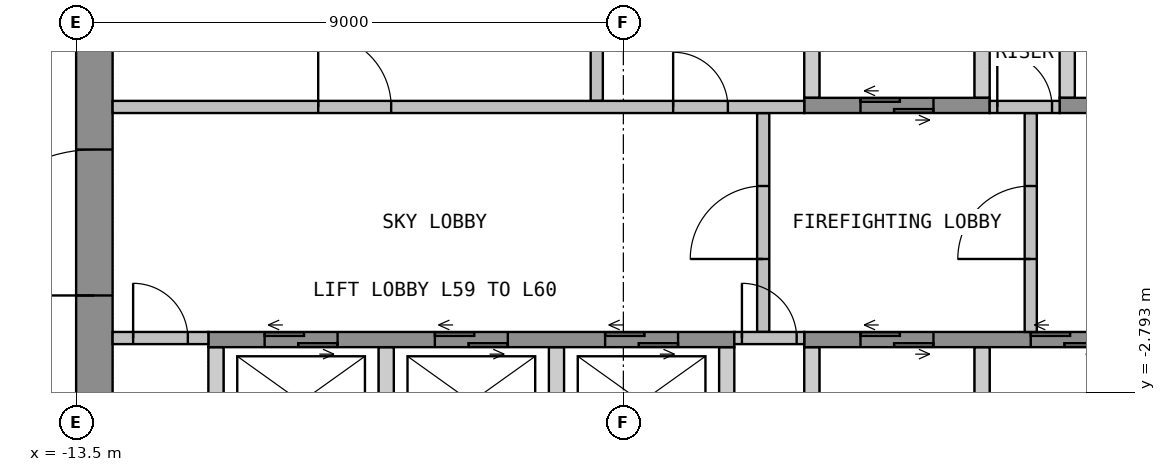
"""IFC4 building model, lengths in metres.
Left out: names, types, materials, properties, quantities, classifications, styles, units other than length and angle.
Written with IfcOpenShell. Run it as: python <this file> out.ifc"""

import sys

from ifc_helpers import new_model, si_unit, direction, frame, frame_2d, origin, place, context, subcontext, project, spatial, polyline, rectangle, outline, extrude, element, fill, save


model = new_model("IFC4")
c1 = context("Model", 3, precision=1e-05, world=origin(), true_north=direction((0.0, 1.0)))
c2 = subcontext(c1, "Body", "Model", "MODEL_VIEW")
j1 = project(units=[si_unit("LENGTHUNIT", "METRE"), si_unit("PLANEANGLEUNIT", "RADIAN")], contexts=[c1])
p1 = place(None, origin())
s1 = spatial("IfcSite", under=j1, at=p1, CompositionType="ELEMENT")
p2 = place(p1, origin())
s2 = spatial("IfcBuilding", under=s1, at=p2, CompositionType="ELEMENT")
p3 = place(p2, frame((0.0, 0.0, 235.2)))
s3 = spatial("IfcBuildingStorey", under=s2, at=p3, CompositionType="ELEMENT", Elevation=235.2)
p4 = place(p3, frame((-13.2, -10.65, 0.0), z_axis=(0.0, 0.0, 1.0), x_axis=(0.0, 1.0, 0.0)))
e1 = element("IfcWall", 1, at=p4, inside=s3, PredefinedType="SHEAR", context=c2, shape_type="SweptSolid", body=[
    extrude(rectangle(XDim=21.3, YDim=0.6, at=frame_2d((10.65, 0.0))), origin(), (0.0, 0.0, 1.0), 3.575),
])
p5 = place(p4, frame((9.45, 0.0, 0.0)))
e2 = element("IfcOpeningElement", 2, at=p5, cuts=e1, PredefinedType="OPENING", context=c2, shape_type="SweptSolid", body=[
    extrude(rectangle(XDim=2.4, YDim=2.1, at=frame_2d((1.2, 1.05))), frame((0.0, 0.31, 0.0), z_axis=(0.0, -1.0, 0.0), x_axis=(1.0, 0.0, 0.0)), (0.0, 0.0, 1.0), 0.62),
])
p6 = place(p3, origin())
e3 = element("IfcWall", 3, at=p6, inside=s3, PredefinedType="SHEAR", context=c2, shape_type="SweptSolid", body=[
    extrude(outline(polyline([(-1.525, 2.05), (-1.275, 2.05), (-1.275, 4.75), (-1.525, 4.75), (-1.525, 2.05)])), origin(), (0.0, 0.0, 1.0), 3.575),
])
p7 = place(p3, origin())
e4 = element("IfcWall", 4, at=p7, inside=s3, PredefinedType="SHEAR", context=c2, shape_type="SweptSolid", body=[
    extrude(outline(polyline([(1.275, 2.05), (1.525, 2.05), (1.525, 4.75), (1.275, 4.75), (1.275, 2.05)])), origin(), (0.0, 0.0, 1.0), 3.575),
])
p8 = place(p3, origin())
e5 = element("IfcWall", 5, at=p8, inside=s3, PredefinedType="SHEAR", context=c2, shape_type="SweptSolid", body=[
    extrude(outline(polyline([(2.675, 2.05), (2.925, 2.05), (2.925, 4.75), (2.675, 4.75), (2.675, 2.05)])), origin(), (0.0, 0.0, 1.0), 3.575),
])
p9 = place(p3, frame((-1.525, 1.925, 0.0), z_axis=(0.0, 0.0, 1.0), x_axis=(1.0, 0.0, 0.0)))
e6 = element("IfcWall", 6, at=p9, inside=s3, PredefinedType="SHEAR", context=c2, shape_type="SweptSolid", body=[
    extrude(rectangle(XDim=3.05, YDim=0.25, at=frame_2d((1.525, 0.0))), origin(), (0.0, 0.0, 1.0), 3.575),
])
p10 = place(p9, frame((0.925, 0.0, 0.0)))
e7 = element("IfcOpeningElement", 7, at=p10, cuts=e6, PredefinedType="OPENING", context=c2, shape_type="SweptSolid", body=[
    extrude(rectangle(XDim=1.2, YDim=2.1, at=frame_2d((0.6, 1.05))), frame((0.0, 0.135, 0.0), z_axis=(0.0, -1.0, 0.0), x_axis=(1.0, 0.0, 0.0)), (0.0, 0.0, 1.0), 0.27),
])
p11 = place(p3, frame((2.675, 1.925, 0.0), z_axis=(0.0, 0.0, 1.0), x_axis=(1.0, 0.0, 0.0)))
e8 = element("IfcWall", 8, at=p11, inside=s3, PredefinedType="SHEAR", context=c2, shape_type="SweptSolid", body=[
    extrude(rectangle(XDim=5.85, YDim=0.25, at=frame_2d((2.925, 0.0))), origin(), (0.0, 0.0, 1.0), 3.575),
])
p12 = place(p11, frame((0.925, 0.0, 0.0)))
e9 = element("IfcOpeningElement", 9, at=p12, cuts=e8, PredefinedType="OPENING", context=c2, shape_type="SweptSolid", body=[
    extrude(rectangle(XDim=1.2, YDim=2.1, at=frame_2d((0.6, 1.05))), frame((0.0, 0.135, 0.0), z_axis=(0.0, -1.0, 0.0), x_axis=(1.0, 0.0, 0.0)), (0.0, 0.0, 1.0), 0.27),
])
p13 = place(p11, frame((3.725, 0.0, 0.0)))
e10 = element("IfcOpeningElement", 10, at=p13, cuts=e8, PredefinedType="OPENING", context=c2, shape_type="SweptSolid", body=[
    extrude(rectangle(XDim=1.2, YDim=2.1, at=frame_2d((0.6, 1.05))), frame((0.0, 0.135, 0.0), z_axis=(0.0, -1.0, 0.0), x_axis=(1.0, 0.0, 0.0)), (0.0, 0.0, 1.0), 0.27),
])
p14 = place(p3, origin())
e11 = element("IfcWall", 11, at=p14, inside=s3, PredefinedType="SHEAR", context=c2, shape_type="SweptSolid", body=[
    extrude(outline(polyline([(-11.325, -4.75), (-11.075, -4.75), (-11.075, -2.05), (-11.325, -2.05), (-11.325, -4.75)])), origin(), (0.0, 0.0, 1.0), 3.575),
])
p15 = place(p3, origin())
e12 = element("IfcWall", 12, at=p15, inside=s3, PredefinedType="SHEAR", context=c2, shape_type="SweptSolid", body=[
    extrude(outline(polyline([(-8.525, -4.75), (-8.275, -4.75), (-8.275, -2.05), (-8.525, -2.05), (-8.525, -4.75)])), origin(), (0.0, 0.0, 1.0), 3.575),
])
p16 = place(p3, origin())
e13 = element("IfcWall", 13, at=p16, inside=s3, PredefinedType="SHEAR", context=c2, shape_type="SweptSolid", body=[
    extrude(outline(polyline([(-5.725, -4.75), (-5.475, -4.75), (-5.475, -2.05), (-5.725, -2.05), (-5.725, -4.75)])), origin(), (0.0, 0.0, 1.0), 3.575),
])
p17 = place(p3, origin())
e14 = element("IfcWall", 14, at=p17, inside=s3, PredefinedType="SHEAR", context=c2, shape_type="SweptSolid", body=[
    extrude(outline(polyline([(-2.925, -4.75), (-2.675, -4.75), (-2.675, -2.05), (-2.925, -2.05), (-2.925, -4.75)])), origin(), (0.0, 0.0, 1.0), 3.575),
])
p18 = place(p3, origin())
e15 = element("IfcWall", 15, at=p18, inside=s3, PredefinedType="SHEAR", context=c2, shape_type="SweptSolid", body=[
    extrude(outline(polyline([(-1.525, -4.75), (-1.275, -4.75), (-1.275, -2.05), (-1.525, -2.05), (-1.525, -4.75)])), origin(), (0.0, 0.0, 1.0), 3.575),
])
p19 = place(p3, origin())
e16 = element("IfcWall", 16, at=p19, inside=s3, PredefinedType="SHEAR", context=c2, shape_type="SweptSolid", body=[
    extrude(outline(polyline([(1.275, -4.75), (1.525, -4.75), (1.525, -2.05), (1.275, -2.05), (1.275, -4.75)])), origin(), (0.0, 0.0, 1.0), 3.575),
])
p20 = place(p3, frame((-11.325, -1.925, 0.0), z_axis=(0.0, 0.0, 1.0), x_axis=(1.0, 0.0, 0.0)))
e17 = element("IfcWall", 17, at=p20, inside=s3, PredefinedType="SHEAR", context=c2, shape_type="SweptSolid", body=[
    extrude(rectangle(XDim=8.65, YDim=0.25, at=frame_2d((4.325, 0.0))), origin(), (0.0, 0.0, 1.0), 3.575),
])
p21 = place(p20, frame((0.925, 0.0, 0.0)))
e18 = element("IfcOpeningElement", 18, at=p21, cuts=e17, PredefinedType="OPENING", context=c2, shape_type="SweptSolid", body=[
    extrude(rectangle(XDim=1.2, YDim=2.1, at=frame_2d((0.6, 1.05))), frame((0.0, 0.135, 0.0), z_axis=(0.0, -1.0, 0.0), x_axis=(1.0, 0.0, 0.0)), (0.0, 0.0, 1.0), 0.27),
])
p22 = place(p20, frame((3.725, 0.0, 0.0)))
e19 = element("IfcOpeningElement", 19, at=p22, cuts=e17, PredefinedType="OPENING", context=c2, shape_type="SweptSolid", body=[
    extrude(rectangle(XDim=1.2, YDim=2.1, at=frame_2d((0.6, 1.05))), frame((0.0, 0.135, 0.0), z_axis=(0.0, -1.0, 0.0), x_axis=(1.0, 0.0, 0.0)), (0.0, 0.0, 1.0), 0.27),
])
p23 = place(p20, frame((6.525, 0.0, 0.0)))
e20 = element("IfcOpeningElement", 20, at=p23, cuts=e17, PredefinedType="OPENING", context=c2, shape_type="SweptSolid", body=[
    extrude(rectangle(XDim=1.2, YDim=2.1, at=frame_2d((0.6, 1.05))), frame((0.0, 0.135, 0.0), z_axis=(0.0, -1.0, 0.0), x_axis=(1.0, 0.0, 0.0)), (0.0, 0.0, 1.0), 0.27),
])
p24 = place(p3, frame((-1.525, -1.925, 0.0), z_axis=(0.0, 0.0, 1.0), x_axis=(1.0, 0.0, 0.0)))
e21 = element("IfcWall", 21, at=p24, inside=s3, PredefinedType="SHEAR", context=c2, shape_type="SweptSolid", body=[
    extrude(rectangle(XDim=14.425, YDim=0.25, at=frame_2d((7.212, 0.0))), origin(), (0.0, 0.0, 1.0), 3.575),
])
p25 = place(p24, frame((0.925, 0.0, 0.0)))
e22 = element("IfcOpeningElement", 22, at=p25, cuts=e21, PredefinedType="OPENING", context=c2, shape_type="SweptSolid", body=[
    extrude(rectangle(XDim=1.2, YDim=2.1, at=frame_2d((0.6, 1.05))), frame((0.0, 0.135, 0.0), z_axis=(0.0, -1.0, 0.0), x_axis=(1.0, 0.0, 0.0)), (0.0, 0.0, 1.0), 0.27),
])
p26 = place(p24, frame((3.725, 0.0, 0.0)))
e23 = element("IfcOpeningElement", 23, at=p26, cuts=e21, PredefinedType="OPENING", context=c2, shape_type="SweptSolid", body=[
    extrude(rectangle(XDim=1.2, YDim=2.1, at=frame_2d((0.6, 1.05))), frame((0.0, 0.135, 0.0), z_axis=(0.0, -1.0, 0.0), x_axis=(1.0, 0.0, 0.0)), (0.0, 0.0, 1.0), 0.27),
])
p27 = place(p24, frame((6.525, 0.0, 0.0)))
e24 = element("IfcOpeningElement", 24, at=p27, cuts=e21, PredefinedType="OPENING", context=c2, shape_type="SweptSolid", body=[
    extrude(rectangle(XDim=1.2, YDim=2.1, at=frame_2d((0.6, 1.05))), frame((0.0, 0.135, 0.0), z_axis=(0.0, -1.0, 0.0), x_axis=(1.0, 0.0, 0.0)), (0.0, 0.0, 1.0), 0.27),
])
p28 = place(p24, frame((9.325, 0.0, 0.0)))
e25 = element("IfcOpeningElement", 25, at=p28, cuts=e21, PredefinedType="OPENING", context=c2, shape_type="SweptSolid", body=[
    extrude(rectangle(XDim=1.2, YDim=2.1, at=frame_2d((0.6, 1.05))), frame((0.0, 0.135, 0.0), z_axis=(0.0, -1.0, 0.0), x_axis=(1.0, 0.0, 0.0)), (0.0, 0.0, 1.0), 0.27),
])
p29 = place(p24, frame((12.125, 0.0, 0.0)))
e26 = element("IfcOpeningElement", 26, at=p29, cuts=e21, PredefinedType="OPENING", context=c2, shape_type="SweptSolid", body=[
    extrude(rectangle(XDim=1.2, YDim=2.1, at=frame_2d((0.6, 1.05))), frame((0.0, 0.135, 0.0), z_axis=(0.0, -1.0, 0.0), x_axis=(1.0, 0.0, 0.0)), (0.0, 0.0, 1.0), 0.27),
])
p30 = place(p3, frame((-2.2, -1.8, 0.0), z_axis=(0.0, 0.0, 1.0), x_axis=(0.0, 1.0, 0.0)))
e27 = element("IfcWall", 27, at=p30, inside=s3, PredefinedType="PARTITIONING", context=c2, shape_type="SweptSolid", body=[
    extrude(rectangle(XDim=3.6, YDim=0.2, at=frame_2d((1.8, 0.0))), origin(), (0.0, 0.0, 1.0), 3.575),
])
p31 = place(p30, frame((1.2, 0.0, 0.0)))
e28 = element("IfcOpeningElement", 28, at=p31, cuts=e27, PredefinedType="OPENING", context=c2, shape_type="SweptSolid", body=[
    extrude(rectangle(XDim=1.2, YDim=2.1, at=frame_2d((0.6, 1.05))), frame((0.0, 0.11, 0.0), z_axis=(0.0, -1.0, 0.0), x_axis=(1.0, 0.0, 0.0)), (0.0, 0.0, 1.0), 0.22),
])
p32 = place(p3, frame((2.2, -1.8, 0.0), z_axis=(0.0, 0.0, 1.0), x_axis=(0.0, 1.0, 0.0)))
e29 = element("IfcWall", 29, at=p32, inside=s3, PredefinedType="PARTITIONING", context=c2, shape_type="SweptSolid", body=[
    extrude(rectangle(XDim=3.6, YDim=0.2, at=frame_2d((1.8, 0.0))), origin(), (0.0, 0.0, 1.0), 3.575),
])
p33 = place(p32, frame((1.2, 0.0, 0.0)))
e30 = element("IfcOpeningElement", 30, at=p33, cuts=e29, PredefinedType="OPENING", context=c2, shape_type="SweptSolid", body=[
    extrude(rectangle(XDim=1.2, YDim=2.1, at=frame_2d((0.6, 1.05))), frame((0.0, 0.11, 0.0), z_axis=(0.0, -1.0, 0.0), x_axis=(1.0, 0.0, 0.0)), (0.0, 0.0, 1.0), 0.22),
])
p34 = place(p3, frame((-4.938, 2.0, 0.0), z_axis=(0.0, 0.0, 1.0), x_axis=(0.0, 1.0, 0.0)))
e31 = element("IfcWall", 31, at=p34, inside=s3, PredefinedType="PARTITIONING", context=c2, shape_type="SweptSolid", body=[
    extrude(rectangle(XDim=2.8, YDim=0.2, at=frame_2d((1.4, 0.0))), origin(), (0.0, 0.0, 1.0), 3.575),
])
p35 = place(p3, frame((-12.9, 1.9, 0.0), z_axis=(0.0, 0.0, 1.0), x_axis=(1.0, 0.0, 0.0)))
e32 = element("IfcWall", 32, at=p35, inside=s3, PredefinedType="PARTITIONING", context=c2, shape_type="SweptSolid", body=[
    extrude(rectangle(XDim=11.375, YDim=0.2, at=frame_2d((5.688, 0.0))), origin(), (0.0, 0.0, 1.0), 3.575),
])
p36 = place(p35, frame((3.381, 0.0, 0.0)))
e33 = element("IfcOpeningElement", 33, at=p36, cuts=e32, PredefinedType="OPENING", context=c2, shape_type="SweptSolid", body=[
    extrude(rectangle(XDim=1.2, YDim=2.1, at=frame_2d((0.6, 1.05))), frame((0.0, 0.11, 0.0), z_axis=(0.0, -1.0, 0.0), x_axis=(1.0, 0.0, 0.0)), (0.0, 0.0, 1.0), 0.22),
])
p37 = place(p35, frame((9.219, 0.0, 0.0)))
e34 = element("IfcOpeningElement", 34, at=p37, cuts=e32, PredefinedType="OPENING", context=c2, shape_type="SweptSolid", body=[
    extrude(rectangle(XDim=0.9, YDim=2.1, at=frame_2d((0.45, 1.05))), frame((0.0, 0.11, 0.0), z_axis=(0.0, -1.0, 0.0), x_axis=(1.0, 0.0, 0.0)), (0.0, 0.0, 1.0), 0.22),
])
p38 = place(p3, frame((1.525, 1.9, 0.0), z_axis=(0.0, 0.0, 1.0), x_axis=(1.0, 0.0, 0.0)))
e35 = element("IfcWall", 35, at=p38, inside=s3, PredefinedType="PARTITIONING", context=c2, shape_type="SweptSolid", body=[
    extrude(rectangle(XDim=1.15, YDim=0.2, at=frame_2d((0.575, 0.0))), origin(), (0.0, 0.0, 1.0), 3.575),
])
p39 = place(p38, frame((0.125, 0.0, 0.0)))
e36 = element("IfcOpeningElement", 36, at=p39, cuts=e35, PredefinedType="OPENING", context=c2, shape_type="SweptSolid", body=[
    extrude(rectangle(XDim=0.9, YDim=2.1, at=frame_2d((0.45, 1.05))), frame((0.0, 0.11, 0.0), z_axis=(0.0, -1.0, 0.0), x_axis=(1.0, 0.0, 0.0)), (0.0, 0.0, 1.0), 0.22),
])
p40 = place(p3, frame((-12.9, -1.9, 0.0), z_axis=(0.0, 0.0, 1.0), x_axis=(1.0, 0.0, 0.0)))
e37 = element("IfcWall", 37, at=p40, inside=s3, PredefinedType="PARTITIONING", context=c2, shape_type="SweptSolid", body=[
    extrude(rectangle(XDim=1.575, YDim=0.2, at=frame_2d((0.788, 0.0))), origin(), (0.0, 0.0, 1.0), 3.575),
])
p41 = place(p40, frame((0.337, 0.0, 0.0)))
e38 = element("IfcOpeningElement", 38, at=p41, cuts=e37, PredefinedType="OPENING", context=c2, shape_type="SweptSolid", body=[
    extrude(rectangle(XDim=0.9, YDim=2.1, at=frame_2d((0.45, 1.05))), frame((0.0, 0.11, 0.0), z_axis=(0.0, -1.0, 0.0), x_axis=(1.0, 0.0, 0.0)), (0.0, 0.0, 1.0), 0.22),
])
p42 = place(p3, frame((-2.675, -1.9, 0.0), z_axis=(0.0, 0.0, 1.0), x_axis=(1.0, 0.0, 0.0)))
e39 = element("IfcWall", 39, at=p42, inside=s3, PredefinedType="PARTITIONING", context=c2, shape_type="SweptSolid", body=[
    extrude(rectangle(XDim=1.15, YDim=0.2, at=frame_2d((0.575, 0.0))), origin(), (0.0, 0.0, 1.0), 3.575),
])
p43 = place(p42, frame((0.125, 0.0, 0.0)))
e40 = element("IfcOpeningElement", 40, at=p43, cuts=e39, PredefinedType="OPENING", context=c2, shape_type="SweptSolid", body=[
    extrude(rectangle(XDim=0.9, YDim=2.1, at=frame_2d((0.45, 1.05))), frame((0.0, 0.11, 0.0), z_axis=(0.0, -1.0, 0.0), x_axis=(1.0, 0.0, 0.0)), (0.0, 0.0, 1.0), 0.22),
])
p44 = place(p5, origin())
e41 = element("IfcDoor", 41, at=p44, inside=s3, OperationType="DOUBLE_DOOR_DOUBLE_SWING", PredefinedType="DOOR", context=c2, shape_type="SweptSolid", body=[
    extrude(rectangle(XDim=2.4, YDim=2.1, at=frame_2d((1.2, 1.05))), frame((0.0, 0.025, 0.0), z_axis=(0.0, -1.0, 0.0), x_axis=(1.0, 0.0, 0.0)), (0.0, 0.0, 1.0), 0.05),
])
fill(e2, e41)
p45 = place(p10, origin())
e42 = element("IfcDoor", 42, at=p45, inside=s3, OperationType="DOUBLE_DOOR_SLIDING", PredefinedType="DOOR", context=c2, shape_type="SweptSolid", body=[
    extrude(rectangle(XDim=1.2, YDim=2.1, at=frame_2d((0.6, 1.05))), frame((0.0, 0.025, 0.0), z_axis=(0.0, -1.0, 0.0), x_axis=(1.0, 0.0, 0.0)), (0.0, 0.0, 1.0), 0.05),
])
fill(e7, e42)
p46 = place(p21, origin())
e43 = element("IfcDoor", 43, at=p46, inside=s3, OperationType="DOUBLE_DOOR_SLIDING", PredefinedType="DOOR", context=c2, shape_type="SweptSolid", body=[
    extrude(rectangle(XDim=1.2, YDim=2.1, at=frame_2d((0.6, 1.05))), frame((0.0, 0.025, 0.0), z_axis=(0.0, -1.0, 0.0), x_axis=(1.0, 0.0, 0.0)), (0.0, 0.0, 1.0), 0.05),
])
fill(e18, e43)
p47 = place(p22, origin())
e44 = element("IfcDoor", 44, at=p47, inside=s3, OperationType="DOUBLE_DOOR_SLIDING", PredefinedType="DOOR", context=c2, shape_type="SweptSolid", body=[
    extrude(rectangle(XDim=1.2, YDim=2.1, at=frame_2d((0.6, 1.05))), frame((0.0, 0.025, 0.0), z_axis=(0.0, -1.0, 0.0), x_axis=(1.0, 0.0, 0.0)), (0.0, 0.0, 1.0), 0.05),
])
fill(e19, e44)
p48 = place(p23, origin())
e45 = element("IfcDoor", 45, at=p48, inside=s3, OperationType="DOUBLE_DOOR_SLIDING", PredefinedType="DOOR", context=c2, shape_type="SweptSolid", body=[
    extrude(rectangle(XDim=1.2, YDim=2.1, at=frame_2d((0.6, 1.05))), frame((0.0, 0.025, 0.0), z_axis=(0.0, -1.0, 0.0), x_axis=(1.0, 0.0, 0.0)), (0.0, 0.0, 1.0), 0.05),
])
fill(e20, e45)
p49 = place(p25, origin())
e46 = element("IfcDoor", 46, at=p49, inside=s3, OperationType="DOUBLE_DOOR_SLIDING", PredefinedType="DOOR", context=c2, shape_type="SweptSolid", body=[
    extrude(rectangle(XDim=1.2, YDim=2.1, at=frame_2d((0.6, 1.05))), frame((0.0, 0.025, 0.0), z_axis=(0.0, -1.0, 0.0), x_axis=(1.0, 0.0, 0.0)), (0.0, 0.0, 1.0), 0.05),
])
fill(e22, e46)
p50 = place(p26, origin())
e47 = element("IfcDoor", 47, at=p50, inside=s3, OperationType="DOUBLE_DOOR_SLIDING", PredefinedType="DOOR", context=c2, shape_type="SweptSolid", body=[
    extrude(rectangle(XDim=1.2, YDim=2.1, at=frame_2d((0.6, 1.05))), frame((0.0, 0.025, 0.0), z_axis=(0.0, -1.0, 0.0), x_axis=(1.0, 0.0, 0.0)), (0.0, 0.0, 1.0), 0.05),
])
fill(e23, e47)
p51 = place(p31, origin())
e48 = element("IfcDoor", 48, at=p51, inside=s3, OperationType="SINGLE_SWING_LEFT", PredefinedType="DOOR", context=c2, shape_type="SweptSolid", body=[
    extrude(rectangle(XDim=1.2, YDim=2.1, at=frame_2d((0.6, 1.05))), frame((0.0, 0.025, 0.0), z_axis=(0.0, -1.0, 0.0), x_axis=(1.0, 0.0, 0.0)), (0.0, 0.0, 1.0), 0.05),
])
fill(e28, e48)
p52 = place(p33, origin())
e49 = element("IfcDoor", 49, at=p52, inside=s3, OperationType="SINGLE_SWING_LEFT", PredefinedType="DOOR", context=c2, shape_type="SweptSolid", body=[
    extrude(rectangle(XDim=1.2, YDim=2.1, at=frame_2d((0.6, 1.05))), frame((0.0, 0.025, 0.0), z_axis=(0.0, -1.0, 0.0), x_axis=(1.0, 0.0, 0.0)), (0.0, 0.0, 1.0), 0.05),
])
fill(e30, e49)
p53 = place(p36, origin())
e50 = element("IfcDoor", 50, at=p53, inside=s3, OperationType="SINGLE_SWING_RIGHT", PredefinedType="DOOR", context=c2, shape_type="SweptSolid", body=[
    extrude(rectangle(XDim=1.2, YDim=2.1, at=frame_2d((0.6, 1.05))), frame((0.0, 0.025, 0.0), z_axis=(0.0, -1.0, 0.0), x_axis=(1.0, 0.0, 0.0)), (0.0, 0.0, 1.0), 0.05),
])
fill(e33, e50)
p54 = place(p37, origin())
e51 = element("IfcDoor", 51, at=p54, inside=s3, OperationType="SINGLE_SWING_LEFT", PredefinedType="DOOR", context=c2, shape_type="SweptSolid", body=[
    extrude(rectangle(XDim=0.9, YDim=2.1, at=frame_2d((0.45, 1.05))), frame((0.0, 0.025, 0.0), z_axis=(0.0, -1.0, 0.0), x_axis=(1.0, 0.0, 0.0)), (0.0, 0.0, 1.0), 0.05),
])
fill(e34, e51)
p55 = place(p39, origin())
e52 = element("IfcDoor", 52, at=p55, inside=s3, OperationType="SINGLE_SWING_LEFT", PredefinedType="DOOR", context=c2, shape_type="SweptSolid", body=[
    extrude(rectangle(XDim=0.9, YDim=2.1, at=frame_2d((0.45, 1.05))), frame((0.0, 0.025, 0.0), z_axis=(0.0, -1.0, 0.0), x_axis=(1.0, 0.0, 0.0)), (0.0, 0.0, 1.0), 0.05),
])
fill(e36, e52)
p56 = place(p41, origin())
e53 = element("IfcDoor", 53, at=p56, inside=s3, OperationType="SINGLE_SWING_LEFT", PredefinedType="DOOR", context=c2, shape_type="SweptSolid", body=[
    extrude(rectangle(XDim=0.9, YDim=2.1, at=frame_2d((0.45, 1.05))), frame((0.0, 0.025, 0.0), z_axis=(0.0, -1.0, 0.0), x_axis=(1.0, 0.0, 0.0)), (0.0, 0.0, 1.0), 0.05),
])
fill(e38, e53)
p57 = place(p43, origin())
e54 = element("IfcDoor", 54, at=p57, inside=s3, OperationType="SINGLE_SWING_LEFT", PredefinedType="DOOR", context=c2, shape_type="SweptSolid", body=[
    extrude(rectangle(XDim=0.9, YDim=2.1, at=frame_2d((0.45, 1.05))), frame((0.0, 0.025, 0.0), z_axis=(0.0, -1.0, 0.0), x_axis=(1.0, 0.0, 0.0)), (0.0, 0.0, 1.0), 0.05),
])
fill(e40, e54)
save(model, sys.argv[1])
